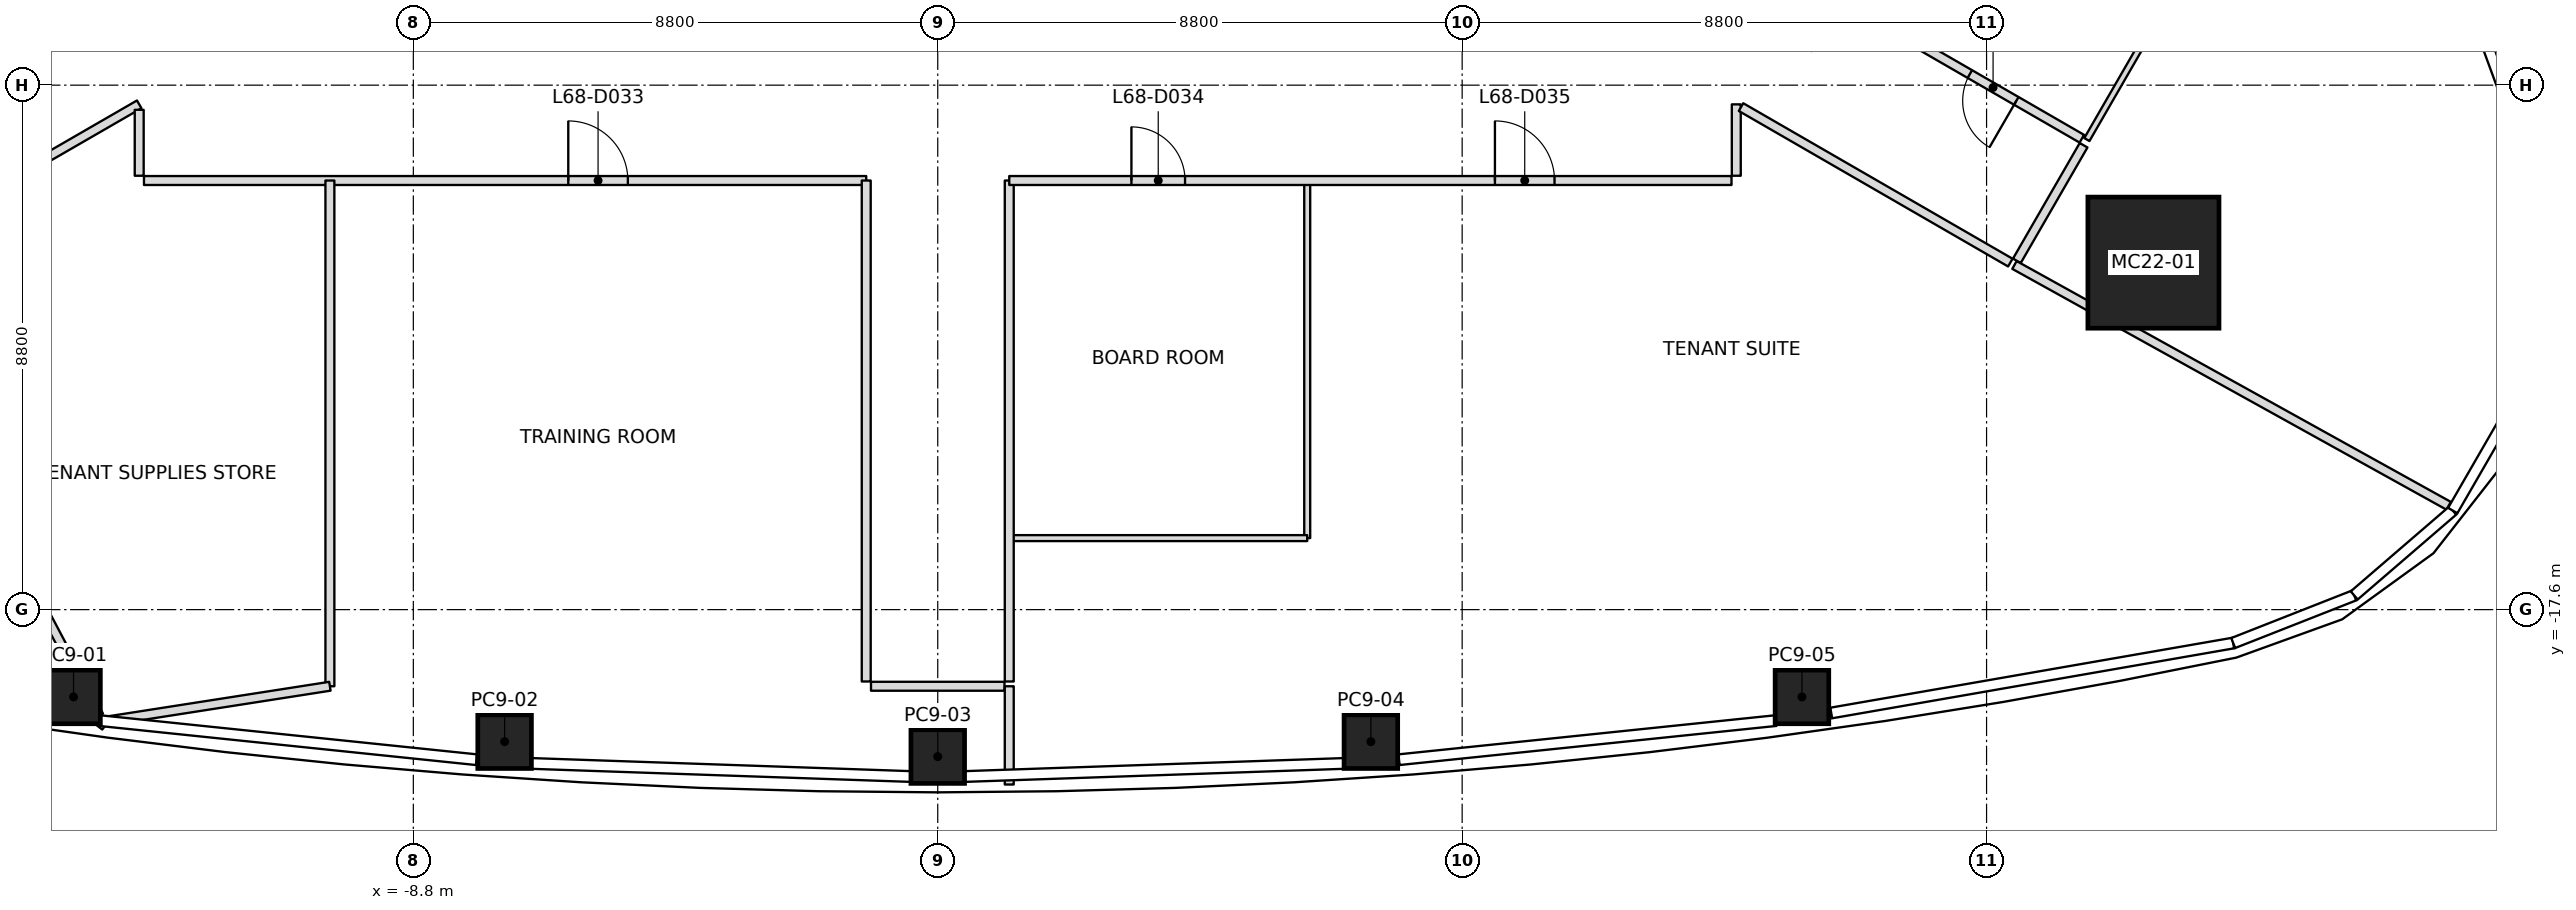
"""IFC4 building model, lengths in metres.
Left out: names, types, materials, properties, quantities, classifications, styles, units other than length and angle.
Written with IfcOpenShell. Run it as: python <this file> out.ifc"""

import sys

from ifc_helpers import new_model, si_unit, direction, frame, frame_2d, origin, origin_2d, place, context, subcontext, project, spatial, rectangle, extrude, element, fill, save


model = new_model("IFC4")
c1 = context("Model", 3, precision=1e-05, world=origin(), true_north=direction((0.0, 1.0)))
c2 = subcontext(c1, "Body", "Model", "MODEL_VIEW")
j1 = project(units=[si_unit("LENGTHUNIT", "METRE"), si_unit("PLANEANGLEUNIT", "RADIAN")], contexts=[c1])
p1 = place(None, origin())
s1 = spatial("IfcSite", under=j1, at=p1, CompositionType="ELEMENT")
p2 = place(p1, origin())
s2 = spatial("IfcBuilding", under=s1, at=p2, CompositionType="ELEMENT")
p3 = place(p2, frame((0.0, 0.0, 299.0)))
s3 = spatial("IfcBuildingStorey", under=s2, at=p3, CompositionType="ELEMENT", Elevation=299.0)
p4 = place(p3, frame((20.4, -11.778, 0.0), z_axis=(-0.027695790401, 0.015983033227, 0.999488612163), x_axis=(0.999616398022, 0.00044283261, 0.027692249912)))
e1 = element("IfcColumn", 1, at=p4, inside=s3, PredefinedType="COLUMN", context=c2, shape_type="SweptSolid", body=[
    extrude(rectangle(XDim=2.2, YDim=2.2, at=origin_2d()), origin(), (0.0, 0.0, 1.0), 4.002),
])
p5 = place(p3, frame((-14.502, -19.065, 0.0), z_axis=(0.017452456582, 0.010373837829, 0.999793876381), x_axis=(-0.99036627662, 0.137561189622, 0.015860556206)))
e2 = element("IfcColumn", 2, at=p5, inside=s3, PredefinedType="COLUMN", context=c2, shape_type="SweptSolid", body=[
    extrude(rectangle(XDim=0.9, YDim=0.9, at=origin_2d()), origin(), (0.0, 0.0, 1.0), 4.001),
])
p6 = place(p3, frame((-7.268, -19.815, 0.0), z_axis=(0.008727150594, 0.011168311599, 0.999899547784), x_axis=(-0.997588475769, 0.068950994539, 0.00793683594)))
e3 = element("IfcColumn", 3, at=p6, inside=s3, PredefinedType="COLUMN", context=c2, shape_type="SweptSolid", body=[
    extrude(rectangle(XDim=0.9, YDim=0.9, at=origin_2d()), origin(), (0.0, 0.0, 1.0), 4.0),
])
p7 = place(p3, frame((0.0, -20.066, 0.0), z_axis=(0.0, 0.01141283087, 0.999934871525), x_axis=(1.0, 0.0, 0.0)))
e4 = element("IfcColumn", 4, at=p7, inside=s3, PredefinedType="COLUMN", context=c2, shape_type="SweptSolid", body=[
    extrude(rectangle(XDim=0.9, YDim=0.9, at=origin_2d()), origin(), (0.0, 0.0, 1.0), 4.0),
])
p8 = place(p3, frame((7.268, -19.815, 0.0), z_axis=(-0.008727150594, 0.011168311599, 0.999899547784), x_axis=(0.997588475769, 0.068950994539, 0.00793683594)))
e5 = element("IfcColumn", 5, at=p8, inside=s3, PredefinedType="COLUMN", context=c2, shape_type="SweptSolid", body=[
    extrude(rectangle(XDim=0.9, YDim=0.9, at=origin_2d()), origin(), (0.0, 0.0, 1.0), 4.0),
])
p9 = place(p3, frame((14.502, -19.065, 0.0), z_axis=(-0.017452456582, 0.010373837829, 0.999793876381), x_axis=(0.99036627662, 0.137561189622, 0.015860556206)))
e6 = element("IfcColumn", 6, at=p9, inside=s3, PredefinedType="COLUMN", context=c2, shape_type="SweptSolid", body=[
    extrude(rectangle(XDim=0.9, YDim=0.9, at=origin_2d()), origin(), (0.0, 0.0, 1.0), 4.001),
])
p10 = place(p3, frame((-18.068, -11.817, 0.0), z_axis=(0.0, 0.0, 1.0), x_axis=(0.467006069064, -0.88425411023, 0.0)))
e7 = element("IfcWall", 7, at=p10, inside=s3, PredefinedType="PARTITIONING", context=c2, shape_type="SweptSolid", body=[
    extrude(rectangle(XDim=8.552, YDim=0.15, at=frame_2d((4.276, 0.0))), origin(), (0.0, 0.0, 1.0), 3.45),
])
p11 = place(p3, frame((-10.2, -10.4, 0.0), z_axis=(0.0, 0.0, 1.0), x_axis=(0.0, -1.0, 0.0)))
e8 = element("IfcWall", 8, at=p11, inside=s3, PredefinedType="PARTITIONING", context=c2, shape_type="SweptSolid", body=[
    extrude(rectangle(XDim=8.486, YDim=0.15, at=frame_2d((4.243, 0.0))), origin(), (0.0, 0.0, 1.0), 3.45),
])
p12 = place(p3, frame((-10.2, -18.886, 0.0), z_axis=(0.0, 0.0, 1.0), x_axis=(-0.988077086967, -0.15395996301, 0.0)))
e9 = element("IfcWall", 9, at=p12, inside=s3, PredefinedType="PARTITIONING", context=c2, shape_type="SweptSolid", body=[
    extrude(rectangle(XDim=3.769, YDim=0.15, at=frame_2d((1.885, 0.0))), origin(), (0.0, 0.0, 1.0), 3.234),
])
p13 = place(p3, frame((-13.974, -19.552, 0.0), z_axis=(0.0, 0.0, 1.0), x_axis=(-0.791052984113, 0.611747641047, 0.0)))
e10 = element("IfcWall", 10, at=p13, inside=s3, PredefinedType="PARTITIONING", context=c2, shape_type="SweptSolid", body=[
    extrude(rectangle(XDim=0.185, YDim=0.15, at=frame_2d((0.093, 0.0))), origin(), (0.0, 0.0, 1.0), 3.45),
])
p14 = place(p3, frame((1.2, -18.886, 0.0), z_axis=(0.0, 0.0, 1.0), x_axis=(0.0, -1.0, 0.0)))
e11 = element("IfcWall", 11, at=p14, inside=s3, PredefinedType="PARTITIONING", context=c2, shape_type="SweptSolid", body=[
    extrude(rectangle(XDim=1.649, YDim=0.15, at=frame_2d((0.824, 0.0))), origin(), (0.0, 0.0, 1.0), 3.234),
])
p15 = place(p3, frame((18.068, -11.817, 0.0), z_axis=(0.0, 0.0, 1.0), x_axis=(0.874521972624, -0.484985896081, 0.0)))
e12 = element("IfcWall", 12, at=p15, inside=s3, PredefinedType="PARTITIONING", context=c2, shape_type="SweptSolid", body=[
    extrude(rectangle(XDim=8.331, YDim=0.15, at=frame_2d((4.166, 0.0))), origin(), (0.0, 0.0, 1.0), 3.234),
])
p16 = place(p3, frame((-13.4, -6.351, 0.0), z_axis=(0.0, 0.0, 1.0), x_axis=(-0.866028933908, -0.499993885596, 0.0)))
e13 = element("IfcWall", 13, at=p16, inside=s3, PredefinedType="PARTITIONING", context=c2, shape_type="SweptSolid", body=[
    extrude(rectangle(XDim=6.696, YDim=0.15, at=frame_2d((3.348, 0.0))), origin(), (0.0, 0.0, 1.0), 3.247),
])
p17 = place(p3, frame((-17.999, -11.777, 0.0), z_axis=(0.0, 0.0, 1.0), x_axis=(0.866036293601, 0.499981137809, 0.0)))
e14 = element("IfcWall", 14, at=p17, inside=s3, PredefinedType="PARTITIONING", context=c2, shape_type="SweptSolid", body=[
    extrude(rectangle(XDim=5.31, YDim=0.15, at=frame_2d((2.655, 0.0))), origin(), (0.0, 0.0, 1.0), 3.233),
])
p18 = place(p17, frame((2.115, 0.0, 0.0)))
e15 = element("IfcOpeningElement", 15, at=p18, cuts=e14, PredefinedType="OPENING", context=c2, shape_type="SweptSolid", body=[
    extrude(rectangle(XDim=1.0, YDim=2.1, at=frame_2d((0.5, 1.05))), frame((0.0, 0.075, 0.0), z_axis=(0.0, -1.0, 0.0), x_axis=(1.0, 0.0, 0.0)), (0.0, 0.0, 1.0), 0.15),
])
p19 = place(p3, frame((-13.4, -9.214, 0.0), z_axis=(0.0, 0.0, 1.0), x_axis=(0.0, -1.0, 0.0)))
e16 = element("IfcWall", 16, at=p19, inside=s3, PredefinedType="PARTITIONING", context=c2, shape_type="SweptSolid", body=[
    extrude(rectangle(XDim=1.106, YDim=0.15, at=frame_2d((0.553, 0.0))), origin(), (0.0, 0.0, 1.0), 3.233),
])
p20 = place(p3, frame((-13.32, -10.4, 0.0), z_axis=(0.0, 0.0, 1.0), x_axis=(1.0, 0.0, 0.0)))
e17 = element("IfcWall", 17, at=p20, inside=s3, PredefinedType="PARTITIONING", context=c2, shape_type="SweptSolid", body=[
    extrude(rectangle(XDim=12.12, YDim=0.15, at=frame_2d((6.06, 0.0))), origin(), (0.0, 0.0, 1.0), 3.393),
])
p21 = place(p20, frame((7.12, 0.0, 0.0)))
e18 = element("IfcOpeningElement", 18, at=p21, cuts=e17, PredefinedType="OPENING", context=c2, shape_type="SweptSolid", body=[
    extrude(rectangle(XDim=1.0, YDim=2.1, at=frame_2d((0.5, 1.05))), frame((0.0, 0.075, 0.0), z_axis=(0.0, -1.0, 0.0), x_axis=(1.0, 0.0, 0.0)), (0.0, 0.0, 1.0), 0.15),
])
p22 = place(p3, frame((-1.2, -10.4, 0.0), z_axis=(0.0, 0.0, 1.0), x_axis=(0.0, -1.0, 0.0)))
e19 = element("IfcWall", 19, at=p22, inside=s3, PredefinedType="PARTITIONING", context=c2, shape_type="SweptSolid", body=[
    extrude(rectangle(XDim=8.406, YDim=0.15, at=frame_2d((4.203, 0.0))), origin(), (0.0, 0.0, 1.0), 3.45),
])
p23 = place(p3, frame((-1.12, -18.886, 0.0), z_axis=(0.0, 0.0, 1.0), x_axis=(1.0, 0.0, 0.0)))
e20 = element("IfcWall", 20, at=p23, inside=s3, PredefinedType="PARTITIONING", context=c2, shape_type="SweptSolid", body=[
    extrude(rectangle(XDim=2.24, YDim=0.15, at=frame_2d((1.12, 0.0))), origin(), (0.0, 0.0, 1.0), 3.45),
])
p24 = place(p3, frame((1.2, -18.806, 0.0), z_axis=(0.0, 0.0, 1.0), x_axis=(0.0, 1.0, 0.0)))
e21 = element("IfcWall", 21, at=p24, inside=s3, PredefinedType="PARTITIONING", context=c2, shape_type="SweptSolid", body=[
    extrude(rectangle(XDim=8.406, YDim=0.15, at=frame_2d((4.203, 0.0))), origin(), (0.0, 0.0, 1.0), 3.45),
])
p25 = place(p3, frame((1.2, -10.4, 0.0), z_axis=(0.0, 0.0, 1.0), x_axis=(1.0, 0.0, 0.0)))
e22 = element("IfcWall", 22, at=p25, inside=s3, PredefinedType="PARTITIONING", context=c2, shape_type="SweptSolid", body=[
    extrude(rectangle(XDim=12.12, YDim=0.15, at=frame_2d((6.06, 0.0))), origin(), (0.0, 0.0, 1.0), 3.393),
])
p26 = place(p25, frame((2.05, 0.0, 0.0)))
e23 = element("IfcOpeningElement", 23, at=p26, cuts=e22, PredefinedType="OPENING", context=c2, shape_type="SweptSolid", body=[
    extrude(rectangle(XDim=0.9, YDim=2.1, at=frame_2d((0.45, 1.05))), frame((0.0, 0.075, 0.0), z_axis=(0.0, -1.0, 0.0), x_axis=(1.0, 0.0, 0.0)), (0.0, 0.0, 1.0), 0.15),
])
p27 = place(p25, frame((8.15, 0.0, 0.0)))
e24 = element("IfcOpeningElement", 24, at=p27, cuts=e22, PredefinedType="OPENING", context=c2, shape_type="SweptSolid", body=[
    extrude(rectangle(XDim=1.0, YDim=2.1, at=frame_2d((0.5, 1.05))), frame((0.0, 0.075, 0.0), z_axis=(0.0, -1.0, 0.0), x_axis=(1.0, 0.0, 0.0)), (0.0, 0.0, 1.0), 0.15),
])
p28 = place(p3, frame((13.4, -10.32, 0.0), z_axis=(0.0, 0.0, 1.0), x_axis=(0.0, 1.0, 0.0)))
e25 = element("IfcWall", 25, at=p28, inside=s3, PredefinedType="PARTITIONING", context=c2, shape_type="SweptSolid", body=[
    extrude(rectangle(XDim=1.198, YDim=0.15, at=frame_2d((0.599, 0.0))), origin(), (0.0, 0.0, 1.0), 3.233),
])
p29 = place(p3, frame((13.479, -9.168, 0.0), z_axis=(0.0, 0.0, 1.0), x_axis=(0.866043800775, -0.499968134123, 0.0)))
e26 = element("IfcWall", 26, at=p29, inside=s3, PredefinedType="PARTITIONING", context=c2, shape_type="SweptSolid", body=[
    extrude(rectangle(XDim=5.219, YDim=0.15, at=frame_2d((2.609, 0.0))), origin(), (0.0, 0.0, 1.0), 3.233),
])
p30 = place(p3, frame((19.199, -9.699, 0.0), z_axis=(0.0, 0.0, 1.0), x_axis=(-0.866028933908, 0.499993885596, 0.0)))
e27 = element("IfcWall", 27, at=p30, inside=s3, PredefinedType="PARTITIONING", context=c2, shape_type="SweptSolid", body=[
    extrude(rectangle(XDim=6.696, YDim=0.15, at=frame_2d((3.348, 0.0))), origin(), (0.0, 0.0, 1.0), 3.247),
])
p31 = place(p30, frame((1.27, 0.0, 0.0)))
e28 = element("IfcOpeningElement", 28, at=p31, cuts=e27, PredefinedType="OPENING", context=c2, shape_type="SweptSolid", body=[
    extrude(rectangle(XDim=0.9, YDim=2.1, at=frame_2d((0.45, 1.05))), frame((0.0, 0.075, 0.0), z_axis=(0.0, -1.0, 0.0), x_axis=(1.0, 0.0, 0.0)), (0.0, 0.0, 1.0), 0.15),
])
p32 = place(p30, frame((4.658, 0.0, 0.0)))
e29 = element("IfcOpeningElement", 29, at=p32, cuts=e27, PredefinedType="OPENING", context=c2, shape_type="SweptSolid", body=[
    extrude(rectangle(XDim=1.0, YDim=2.1, at=frame_2d((0.5, 1.05))), frame((0.0, 0.075, 0.0), z_axis=(0.0, -1.0, 0.0), x_axis=(1.0, 0.0, 0.0)), (0.0, 0.0, 1.0), 0.15),
])
p33 = place(p3, frame((18.108, -11.748, 0.0), z_axis=(0.0, 0.0, 1.0), x_axis=(0.49994888933, 0.866054910533, 0.0)))
e30 = element("IfcWall", 30, at=p33, inside=s3, PredefinedType="PARTITIONING", context=c2, shape_type="SweptSolid", body=[
    extrude(rectangle(XDim=2.24, YDim=0.15, at=frame_2d((1.12, 0.0))), origin(), (0.0, 0.0, 1.0), 3.233),
])
p34 = place(p3, frame((6.2, -10.43, 0.0), z_axis=(0.0, 0.0, 1.0), x_axis=(0.0, -1.0, 0.0)))
e31 = element("IfcWall", 31, at=p34, inside=s3, PredefinedType="PARTITIONING", context=c2, shape_type="SweptSolid", body=[
    extrude(rectangle(XDim=5.97, YDim=0.1, at=frame_2d((2.985, 0.0))), origin(), (0.0, 0.0, 1.0), 3.45),
])
p35 = place(p3, frame((6.2, -16.4, 0.0), z_axis=(0.0, 0.0, 1.0), x_axis=(-1.0, 0.0, 0.0)))
e32 = element("IfcWall", 32, at=p35, inside=s3, PredefinedType="PARTITIONING", context=c2, shape_type="SweptSolid", body=[
    extrude(rectangle(XDim=4.97, YDim=0.1, at=frame_2d((2.485, 0.0))), origin(), (0.0, 0.0, 1.0), 3.393),
])
p36 = place(p3, frame((21.368, -6.102, 0.0), z_axis=(0.0, 0.0, 1.0), x_axis=(-0.499992746786, -0.866029591389, 0.0)))
e33 = element("IfcWall", 33, at=p36, inside=s3, PredefinedType="PARTITIONING", context=c2, shape_type="SweptSolid", body=[
    extrude(rectangle(XDim=4.17, YDim=0.1, at=frame_2d((2.085, 0.0))), origin(), (0.0, 0.0, 1.0), 3.45),
])
p37 = place(p21, origin())
e34 = element("IfcDoor", 34, at=p37, inside=s3, OperationType="SINGLE_SWING_LEFT", PredefinedType="DOOR", context=c2, shape_type="SweptSolid", body=[
    extrude(rectangle(XDim=1.0, YDim=2.1, at=frame_2d((0.5, 1.05))), frame((0.0, 0.025, 0.0), z_axis=(0.0, -1.0, 0.0), x_axis=(1.0, 0.0, 0.0)), (0.0, 0.0, 1.0), 0.05),
])
fill(e18, e34)
p38 = place(p26, origin())
e35 = element("IfcDoor", 35, at=p38, inside=s3, OperationType="SINGLE_SWING_LEFT", PredefinedType="DOOR", context=c2, shape_type="SweptSolid", body=[
    extrude(rectangle(XDim=0.9, YDim=2.1, at=frame_2d((0.45, 1.05))), frame((0.0, 0.025, 0.0), z_axis=(0.0, -1.0, 0.0), x_axis=(1.0, 0.0, 0.0)), (0.0, 0.0, 1.0), 0.05),
])
fill(e23, e35)
p39 = place(p27, origin())
e36 = element("IfcDoor", 36, at=p39, inside=s3, OperationType="SINGLE_SWING_LEFT", PredefinedType="DOOR", context=c2, shape_type="SweptSolid", body=[
    extrude(rectangle(XDim=1.0, YDim=2.1, at=frame_2d((0.5, 1.05))), frame((0.0, 0.025, 0.0), z_axis=(0.0, -1.0, 0.0), x_axis=(1.0, 0.0, 0.0)), (0.0, 0.0, 1.0), 0.05),
])
fill(e24, e36)
p40 = place(p31, origin())
e37 = element("IfcDoor", 37, at=p40, inside=s3, OperationType="SINGLE_SWING_LEFT", PredefinedType="DOOR", context=c2, shape_type="SweptSolid", body=[
    extrude(rectangle(XDim=0.9, YDim=2.1, at=frame_2d((0.45, 1.05))), frame((0.0, 0.025, 0.0), z_axis=(0.0, -1.0, 0.0), x_axis=(1.0, 0.0, 0.0)), (0.0, 0.0, 1.0), 0.05),
])
fill(e28, e37)
save(model, sys.argv[1])
